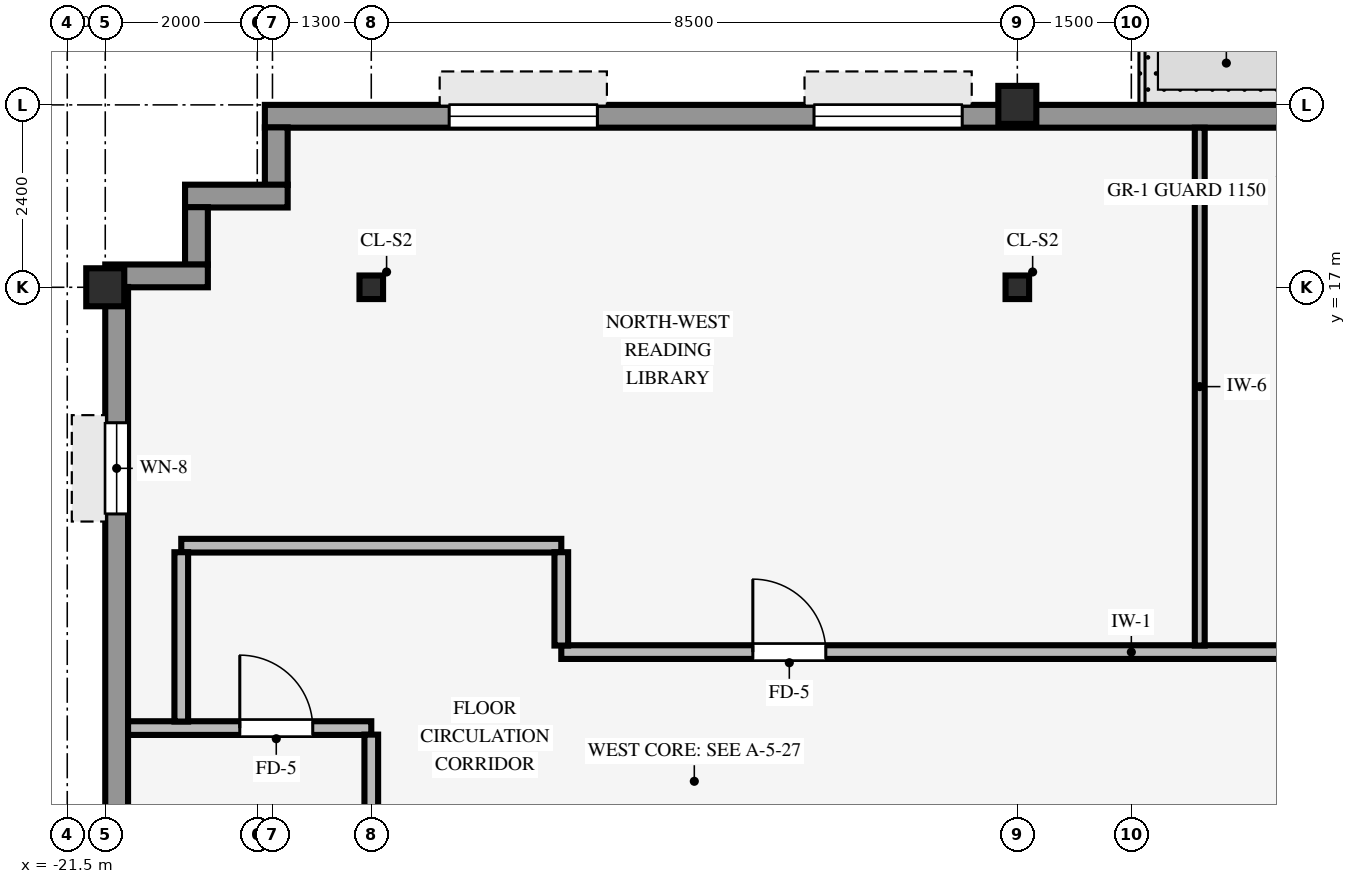
"""IFC4 building model, lengths in metres.
Left out: names, types, materials, properties, quantities, classifications, styles, units other than length and angle.
Written with IfcOpenShell. Run it as: python <this file> out.ifc"""

import sys

from ifc_helpers import new_model, si_unit, direction, frame, frame_2d, origin, origin_2d, place, context, subcontext, project, spatial, rectangle, hollow_rectangle, i_section, extrude, source, transform, mapped, element, fill, save


model = new_model("IFC4")
c1 = context("Model", 3, precision=1e-05, world=origin(), true_north=direction((0.0, 1.0)))
c2 = subcontext(c1, "Body", "Model", "MODEL_VIEW")
j1 = project(units=[si_unit("LENGTHUNIT", "METRE"), si_unit("PLANEANGLEUNIT", "RADIAN")], contexts=[c1])
p1 = place(None, origin())
s1 = spatial("IfcSite", under=j1, at=p1, CompositionType="ELEMENT")
p2 = place(p1, origin())
s2 = spatial("IfcBuilding", under=s1, at=p2, CompositionType="ELEMENT")
p3 = place(p2, frame((0.0, 0.0, 279.85)))
s3 = spatial("IfcBuildingStorey", under=s2, at=p3, CompositionType="ELEMENT", Elevation=279.85)
for number, where, z_axis, x_axis in (
    (1, (-21.0, 17.0, 0.0), (0.0, 0.0, 1.0), (1.0, 0.0, 0.0)),
    (2, (-9.0, 19.4, 0.0), (0.0, 0.0, 1.0), (1.0, 0.0, 0.0)),
):
    element("IfcColumn", number, at=place(p3, frame(where, z_axis=z_axis, x_axis=x_axis)), inside=s3, PredefinedType="COLUMN", context=c2, shape_type="SweptSolid", body=[
        extrude(hollow_rectangle(XDim=0.5, YDim=0.5, WallThickness=0.032, InnerFilletRadius=0.032, OuterFilletRadius=0.064, at=origin_2d()), origin(), (0.0, 0.0, 1.0), 3.37),
    ])
for number, where, z_axis, x_axis in (
    (3, (-17.5, 17.0, 0.0), (0.0, 0.0, 1.0), (1.0, 0.0, 0.0)),
    (4, (-9.0, 17.0, 0.0), (0.0, 0.0, 1.0), (1.0, 0.0, 0.0)),
):
    element("IfcColumn", number, at=place(p3, frame(where, z_axis=z_axis, x_axis=x_axis)), inside=s3, PredefinedType="COLUMN", context=c2, shape_type="SweptSolid", body=[
        extrude(i_section(OverallWidth=0.31, OverallDepth=0.31, WebThickness=0.015, FlangeThickness=0.015, FilletRadius=0.015, at=origin_2d()), origin(), (0.0, 0.0, 1.0), 3.37),
    ])
p4 = place(p3, frame((-18.9, 19.25, 0.0), z_axis=(0.0, 0.0, 1.0), x_axis=(1.0, 0.0, 0.0)))
e5 = element("IfcWall", 5, at=p4, inside=s3, PredefinedType="STANDARD", context=c2, shape_type="SweptSolid", body=[
    extrude(rectangle(XDim=35.6, YDim=0.3, at=frame_2d((17.8, 0.0))), origin(), (0.0, 0.0, 1.0), 2.705),
])
p5 = place(p4, frame((13.6, 0.0, 0.0)))
e6 = element("IfcOpeningElement", 6, at=p5, cuts=e5, PredefinedType="OPENING", context=c2, shape_type="SweptSolid", body=[
    extrude(rectangle(XDim=0.98, YDim=2.15, at=frame_2d((0.49, 1.075))), frame((0.0, 0.16, 0.0), z_axis=(0.0, -1.0, 0.0), x_axis=(1.0, 0.0, 0.0)), (0.0, 0.0, 1.0), 0.32),
])
p6 = place(p4, frame((2.425, 0.0, 0.8)))
e7 = element("IfcOpeningElement", 7, at=p6, cuts=e5, PredefinedType="OPENING", context=c2, shape_type="SweptSolid", body=[
    extrude(rectangle(XDim=1.95, YDim=1.48, at=frame_2d((0.975, 0.74))), frame((0.0, 0.16, 0.0), z_axis=(0.0, -1.0, 0.0), x_axis=(1.0, 0.0, 0.0)), (0.0, 0.0, 1.0), 0.32),
])
p7 = place(p4, frame((7.225, 0.0, 0.8)))
e8 = element("IfcOpeningElement", 8, at=p7, cuts=e5, PredefinedType="OPENING", context=c2, shape_type="SweptSolid", body=[
    extrude(rectangle(XDim=1.95, YDim=1.48, at=frame_2d((0.975, 0.74))), frame((0.0, 0.16, 0.0), z_axis=(0.0, -1.0, 0.0), x_axis=(1.0, 0.0, 0.0)), (0.0, 0.0, 1.0), 0.32),
])
p8 = place(p4, frame((15.925, 0.0, 0.8)))
e9 = element("IfcOpeningElement", 9, at=p8, cuts=e5, PredefinedType="OPENING", context=c2, shape_type="SweptSolid", body=[
    extrude(rectangle(XDim=1.95, YDim=1.48, at=frame_2d((0.975, 0.74))), frame((0.0, 0.16, 0.0), z_axis=(0.0, -1.0, 0.0), x_axis=(1.0, 0.0, 0.0)), (0.0, 0.0, 1.0), 0.32),
])
p9 = place(p4, frame((21.625, 0.0, 0.8)))
e10 = element("IfcOpeningElement", 10, at=p9, cuts=e5, PredefinedType="OPENING", context=c2, shape_type="SweptSolid", body=[
    extrude(rectangle(XDim=1.95, YDim=1.48, at=frame_2d((0.975, 0.74))), frame((0.0, 0.16, 0.0), z_axis=(0.0, -1.0, 0.0), x_axis=(1.0, 0.0, 0.0)), (0.0, 0.0, 1.0), 0.32),
])
p10 = place(p4, frame((31.225, 0.0, 0.8)))
e11 = element("IfcOpeningElement", 11, at=p10, cuts=e5, PredefinedType="OPENING", context=c2, shape_type="SweptSolid", body=[
    extrude(rectangle(XDim=1.95, YDim=1.48, at=frame_2d((0.975, 0.74))), frame((0.0, 0.16, 0.0), z_axis=(0.0, -1.0, 0.0), x_axis=(1.0, 0.0, 0.0)), (0.0, 0.0, 1.0), 0.32),
])
p11 = place(p3, frame((-18.75, 18.346, 0.0), z_axis=(0.0, 0.0, 1.0), x_axis=(0.0, 1.0, 0.0)))
e12 = element("IfcWall", 12, at=p11, inside=s3, PredefinedType="STANDARD", context=c2, shape_type="SweptSolid", body=[
    extrude(rectangle(XDim=0.758, YDim=0.3, at=frame_2d((0.379, 0.0))), origin(), (0.0, 0.0, 1.0), 2.892),
])
p12 = place(p3, frame((-19.95, 18.2, 0.0), z_axis=(0.0, 0.0, 1.0), x_axis=(1.0, 0.0, 0.0)))
e13 = element("IfcWall", 13, at=p12, inside=s3, PredefinedType="STANDARD", context=c2, shape_type="SweptSolid", body=[
    extrude(rectangle(XDim=1.35, YDim=0.3, at=frame_2d((0.675, 0.0))), origin(), (0.0, 0.0, 1.0), 2.892),
])
p13 = place(p3, frame((-19.8, 17.296, 0.0), z_axis=(0.0, 0.0, 1.0), x_axis=(0.0, 1.0, 0.0)))
e14 = element("IfcWall", 14, at=p13, inside=s3, PredefinedType="STANDARD", context=c2, shape_type="SweptSolid", body=[
    extrude(rectangle(XDim=0.758, YDim=0.3, at=frame_2d((0.379, 0.0))), origin(), (0.0, 0.0, 1.0), 2.892),
])
p14 = place(p3, frame((-21.0, 17.15, 0.0), z_axis=(0.0, 0.0, 1.0), x_axis=(1.0, 0.0, 0.0)))
e15 = element("IfcWall", 15, at=p14, inside=s3, PredefinedType="STANDARD", context=c2, shape_type="SweptSolid", body=[
    extrude(rectangle(XDim=1.35, YDim=0.3, at=frame_2d((0.675, 0.0))), origin(), (0.0, 0.0, 1.0), 2.892),
])
p15 = place(p3, frame((-20.85, -17.004, 0.0), z_axis=(0.0, 0.0, 1.0), x_axis=(0.0, 1.0, 0.0)))
e16 = element("IfcWall", 16, at=p15, inside=s3, PredefinedType="STANDARD", context=c2, shape_type="SweptSolid", body=[
    extrude(rectangle(XDim=34.008, YDim=0.3, at=frame_2d((17.004, 0.0))), origin(), (0.0, 0.0, 1.0), 2.705),
])
p16 = place(p15, frame((1.786, 0.0, 0.8)))
e17 = element("IfcOpeningElement", 17, at=p16, cuts=e16, PredefinedType="OPENING", context=c2, shape_type="SweptSolid", body=[
    extrude(rectangle(XDim=1.2, YDim=1.48, at=frame_2d((0.6, 0.74))), frame((0.0, 0.16, 0.0), z_axis=(0.0, -1.0, 0.0), x_axis=(1.0, 0.0, 0.0)), (0.0, 0.0, 1.0), 0.32),
])
p17 = place(p15, frame((8.159, 0.0, 0.8)))
e18 = element("IfcOpeningElement", 18, at=p17, cuts=e16, PredefinedType="OPENING", context=c2, shape_type="SweptSolid", body=[
    extrude(rectangle(XDim=1.2, YDim=1.48, at=frame_2d((0.6, 0.74))), frame((0.0, 0.16, 0.0), z_axis=(0.0, -1.0, 0.0), x_axis=(1.0, 0.0, 0.0)), (0.0, 0.0, 1.0), 0.32),
])
p18 = place(p15, frame((11.831, 0.0, 0.8)))
e19 = element("IfcOpeningElement", 19, at=p18, cuts=e16, PredefinedType="OPENING", context=c2, shape_type="SweptSolid", body=[
    extrude(rectangle(XDim=1.2, YDim=1.48, at=frame_2d((0.6, 0.74))), frame((0.0, 0.16, 0.0), z_axis=(0.0, -1.0, 0.0), x_axis=(1.0, 0.0, 0.0)), (0.0, 0.0, 1.0), 0.32),
])
p19 = place(p15, frame((15.054, 0.0, 0.8)))
e20 = element("IfcOpeningElement", 20, at=p19, cuts=e16, PredefinedType="OPENING", context=c2, shape_type="SweptSolid", body=[
    extrude(rectangle(XDim=1.2, YDim=1.48, at=frame_2d((0.6, 0.74))), frame((0.0, 0.16, 0.0), z_axis=(0.0, -1.0, 0.0), x_axis=(1.0, 0.0, 0.0)), (0.0, 0.0, 1.0), 0.32),
])
p20 = place(p15, frame((20.977, 0.0, 0.8)))
e21 = element("IfcOpeningElement", 21, at=p20, cuts=e16, PredefinedType="OPENING", context=c2, shape_type="SweptSolid", body=[
    extrude(rectangle(XDim=1.2, YDim=1.48, at=frame_2d((0.6, 0.74))), frame((0.0, 0.16, 0.0), z_axis=(0.0, -1.0, 0.0), x_axis=(1.0, 0.0, 0.0)), (0.0, 0.0, 1.0), 0.32),
])
p21 = place(p15, frame((24.649, 0.0, 0.8)))
e22 = element("IfcOpeningElement", 22, at=p21, cuts=e16, PredefinedType="OPENING", context=c2, shape_type="SweptSolid", body=[
    extrude(rectangle(XDim=1.2, YDim=1.48, at=frame_2d((0.6, 0.74))), frame((0.0, 0.16, 0.0), z_axis=(0.0, -1.0, 0.0), x_axis=(1.0, 0.0, 0.0)), (0.0, 0.0, 1.0), 0.32),
])
p22 = place(p15, frame((31.022, 0.0, 0.8)))
e23 = element("IfcOpeningElement", 23, at=p22, cuts=e16, PredefinedType="OPENING", context=c2, shape_type="SweptSolid", body=[
    extrude(rectangle(XDim=1.2, YDim=1.48, at=frame_2d((0.6, 0.74))), frame((0.0, 0.16, 0.0), z_axis=(0.0, -1.0, 0.0), x_axis=(1.0, 0.0, 0.0)), (0.0, 0.0, 1.0), 0.32),
])
p23 = place(p3, frame((-20.7, 11.2, 0.0), z_axis=(0.0, 0.0, 1.0), x_axis=(1.0, 0.0, 0.0)))
e24 = element("IfcWall", 24, at=p23, inside=s3, PredefinedType="PARTITIONING", context=c2, shape_type="SweptSolid", body=[
    extrude(rectangle(XDim=3.2, YDim=0.18, at=frame_2d((1.6, 0.0))), origin(), (0.0, 0.0, 1.0), 3.36),
])
p24 = place(p23, frame((1.47, 0.0, 0.0)))
e25 = element("IfcOpeningElement", 25, at=p24, cuts=e24, PredefinedType="OPENING", context=c2, shape_type="SweptSolid", body=[
    extrude(rectangle(XDim=0.96, YDim=2.1, at=frame_2d((0.48, 1.05))), frame((0.0, 0.1, 0.0), z_axis=(0.0, -1.0, 0.0), x_axis=(1.0, 0.0, 0.0)), (0.0, 0.0, 1.0), 0.2),
])
p25 = place(p3, frame((-15.0, 12.2, 0.0), z_axis=(0.0, 0.0, 1.0), x_axis=(1.0, 0.0, 0.0)))
e26 = element("IfcWall", 26, at=p25, inside=s3, PredefinedType="PARTITIONING", context=c2, shape_type="SweptSolid", body=[
    extrude(rectangle(XDim=30.8, YDim=0.18, at=frame_2d((15.4, 0.0))), origin(), (0.0, 0.0, 1.0), 3.36),
])
p26 = place(p25, frame((11.52, 0.0, 0.0)))
e27 = element("IfcOpeningElement", 27, at=p26, cuts=e26, PredefinedType="OPENING", context=c2, shape_type="SweptSolid", body=[
    extrude(rectangle(XDim=0.96, YDim=2.1, at=frame_2d((0.48, 1.05))), frame((0.0, 0.1, 0.0), z_axis=(0.0, -1.0, 0.0), x_axis=(1.0, 0.0, 0.0)), (0.0, 0.0, 1.0), 0.2),
])
p27 = place(p25, frame((2.52, 0.0, 0.0)))
e28 = element("IfcOpeningElement", 28, at=p27, cuts=e26, PredefinedType="OPENING", context=c2, shape_type="SweptSolid", body=[
    extrude(rectangle(XDim=0.96, YDim=2.1, at=frame_2d((0.48, 1.05))), frame((0.0, 0.1, 0.0), z_axis=(0.0, -1.0, 0.0), x_axis=(1.0, 0.0, 0.0)), (0.0, 0.0, 1.0), 0.2),
])
p28 = place(p25, frame((28.32, 0.0, 0.0)))
e29 = element("IfcOpeningElement", 29, at=p28, cuts=e26, PredefinedType="OPENING", context=c2, shape_type="SweptSolid", body=[
    extrude(rectangle(XDim=0.96, YDim=2.1, at=frame_2d((0.48, 1.05))), frame((0.0, 0.1, 0.0), z_axis=(0.0, -1.0, 0.0), x_axis=(1.0, 0.0, 0.0)), (0.0, 0.0, 1.0), 0.2),
])
p29 = place(p25, frame((24.92, 0.0, 0.0)))
e30 = element("IfcOpeningElement", 30, at=p29, cuts=e26, PredefinedType="OPENING", context=c2, shape_type="SweptSolid", body=[
    extrude(rectangle(XDim=0.96, YDim=2.1, at=frame_2d((0.48, 1.05))), frame((0.0, 0.1, 0.0), z_axis=(0.0, -1.0, 0.0), x_axis=(1.0, 0.0, 0.0)), (0.0, 0.0, 1.0), 0.2),
])
p30 = place(p25, frame((16.2, 0.0, 0.0)))
e31 = element("IfcOpeningElement", 31, at=p30, cuts=e26, PredefinedType="OPENING", context=c2, shape_type="SweptSolid", body=[
    extrude(rectangle(XDim=0.9, YDim=2.1, at=frame_2d((0.45, 1.05))), frame((0.0, 0.1, 0.0), z_axis=(0.0, -1.0, 0.0), x_axis=(1.0, 0.0, 0.0)), (0.0, 0.0, 1.0), 0.2),
])
p31 = place(p25, frame((18.3, 0.0, 0.0)))
e32 = element("IfcOpeningElement", 32, at=p31, cuts=e26, PredefinedType="OPENING", context=c2, shape_type="SweptSolid", body=[
    extrude(rectangle(XDim=0.9, YDim=2.1, at=frame_2d((0.45, 1.05))), frame((0.0, 0.1, 0.0), z_axis=(0.0, -1.0, 0.0), x_axis=(1.0, 0.0, 0.0)), (0.0, 0.0, 1.0), 0.2),
])
p32 = place(p25, frame((20.25, 0.0, 0.0)))
e33 = element("IfcOpeningElement", 33, at=p32, cuts=e26, PredefinedType="OPENING", context=c2, shape_type="SweptSolid", body=[
    extrude(rectangle(XDim=0.9, YDim=2.1, at=frame_2d((0.45, 1.05))), frame((0.0, 0.1, 0.0), z_axis=(0.0, -1.0, 0.0), x_axis=(1.0, 0.0, 0.0)), (0.0, 0.0, 1.0), 0.2),
])
p33 = place(p3, frame((-20.0, 13.6, 0.0), z_axis=(0.0, 0.0, 1.0), x_axis=(1.0, 0.0, 0.0)))
e34 = element("IfcWall", 34, at=p33, inside=s3, PredefinedType="PARTITIONING", context=c2, shape_type="SweptSolid", body=[
    extrude(rectangle(XDim=5.0, YDim=0.18, at=frame_2d((2.5, 0.0))), origin(), (0.0, 0.0, 1.0), 3.038),
])
p34 = place(p3, frame((-20.0, 11.286, 0.0), z_axis=(0.0, 0.0, 1.0), x_axis=(0.0, 1.0, 0.0)))
e35 = element("IfcWall", 35, at=p34, inside=s3, PredefinedType="PARTITIONING", context=c2, shape_type="SweptSolid", body=[
    extrude(rectangle(XDim=2.228, YDim=0.18, at=frame_2d((1.114, 0.0))), origin(), (0.0, 0.0, 1.0), 3.36),
])
p35 = place(p3, frame((-17.5, 9.996, 0.0), z_axis=(0.0, 0.0, 1.0), x_axis=(0.0, 1.0, 0.0)))
e36 = element("IfcWall", 36, at=p35, inside=s3, PredefinedType="PARTITIONING", context=c2, shape_type="SweptSolid", body=[
    extrude(rectangle(XDim=1.118, YDim=0.18, at=frame_2d((0.559, 0.0))), origin(), (0.0, 0.0, 1.0), 2.892),
])
p36 = place(p3, frame((-15.0, 12.286, 0.0), z_axis=(0.0, 0.0, 1.0), x_axis=(0.0, 1.0, 0.0)))
e37 = element("IfcWall", 37, at=p36, inside=s3, PredefinedType="PARTITIONING", context=c2, shape_type="SweptSolid", body=[
    extrude(rectangle(XDim=1.228, YDim=0.18, at=frame_2d((0.614, 0.0))), origin(), (0.0, 0.0, 1.0), 3.36),
])
p37 = place(p3, frame((-6.6, 12.286, 0.0), z_axis=(0.0, 0.0, 1.0), x_axis=(0.0, 1.0, 0.0)))
e38 = element("IfcWall", 38, at=p37, inside=s3, PredefinedType="PARTITIONING", context=c2, shape_type="SweptSolid", body=[
    extrude(rectangle(XDim=6.814, YDim=0.13, at=frame_2d((3.407, 0.0))), origin(), (0.0, 0.0, 1.0), 3.36),
])
m1 = source(origin(), c2, "Body", "SweptSolid", [
    extrude(rectangle(XDim=1.95, YDim=1.48, at=frame_2d((0.975, 0.74))), frame((0.0, 0.03, 0.0), z_axis=(0.0, -1.0, 0.0), x_axis=(1.0, 0.0, 0.0)), (0.0, 0.0, 1.0), 0.06),
])
p38 = place(p6, origin())
e39 = element("IfcWindow", 39, at=p38, inside=s3, PartitioningType="SINGLE_PANEL", PredefinedType="WINDOW", context=c2, shape_type="MappedRepresentation", body=[
    mapped(m1, transform((0.0, 0.0, 0.0), scale=1.0)),
])
fill(e7, e39)
p39 = place(p7, origin())
e40 = element("IfcWindow", 40, at=p39, inside=s3, PartitioningType="SINGLE_PANEL", PredefinedType="WINDOW", context=c2, shape_type="MappedRepresentation", body=[
    mapped(m1, transform((0.0, 0.0, 0.0), scale=1.0)),
])
fill(e8, e40)
m2 = source(origin(), c2, "Body", "SweptSolid", [
    extrude(rectangle(XDim=1.2, YDim=1.48, at=frame_2d((0.6, 0.74))), frame((0.0, 0.03, 0.0), z_axis=(0.0, -1.0, 0.0), x_axis=(1.0, 0.0, 0.0)), (0.0, 0.0, 1.0), 0.06),
])
p40 = place(p22, origin())
e41 = element("IfcWindow", 41, at=p40, inside=s3, PartitioningType="SINGLE_PANEL", PredefinedType="WINDOW", context=c2, shape_type="MappedRepresentation", body=[
    mapped(m2, transform((0.0, 0.0, 0.0), scale=1.0)),
])
fill(e23, e41)
m3 = source(origin(), c2, "Body", "SweptSolid", [
    extrude(rectangle(XDim=0.96, YDim=2.1, at=frame_2d((0.48, 1.05))), frame((0.0, 0.025, 0.0), z_axis=(0.0, -1.0, 0.0), x_axis=(1.0, 0.0, 0.0)), (0.0, 0.0, 1.0), 0.05),
])
p41 = place(p27, origin())
e42 = element("IfcDoor", 42, at=p41, inside=s3, OperationType="SINGLE_SWING_LEFT", PredefinedType="DOOR", context=c2, shape_type="MappedRepresentation", body=[
    mapped(m3, transform((0.0, 0.0, 0.0), scale=1.0)),
])
fill(e28, e42)
p42 = place(p24, origin())
e43 = element("IfcDoor", 43, at=p42, inside=s3, OperationType="SINGLE_SWING_LEFT", PredefinedType="DOOR", context=c2, shape_type="MappedRepresentation", body=[
    mapped(m3, transform((0.0, 0.0, 0.0), scale=1.0)),
])
fill(e25, e43)
save(model, sys.argv[1])
